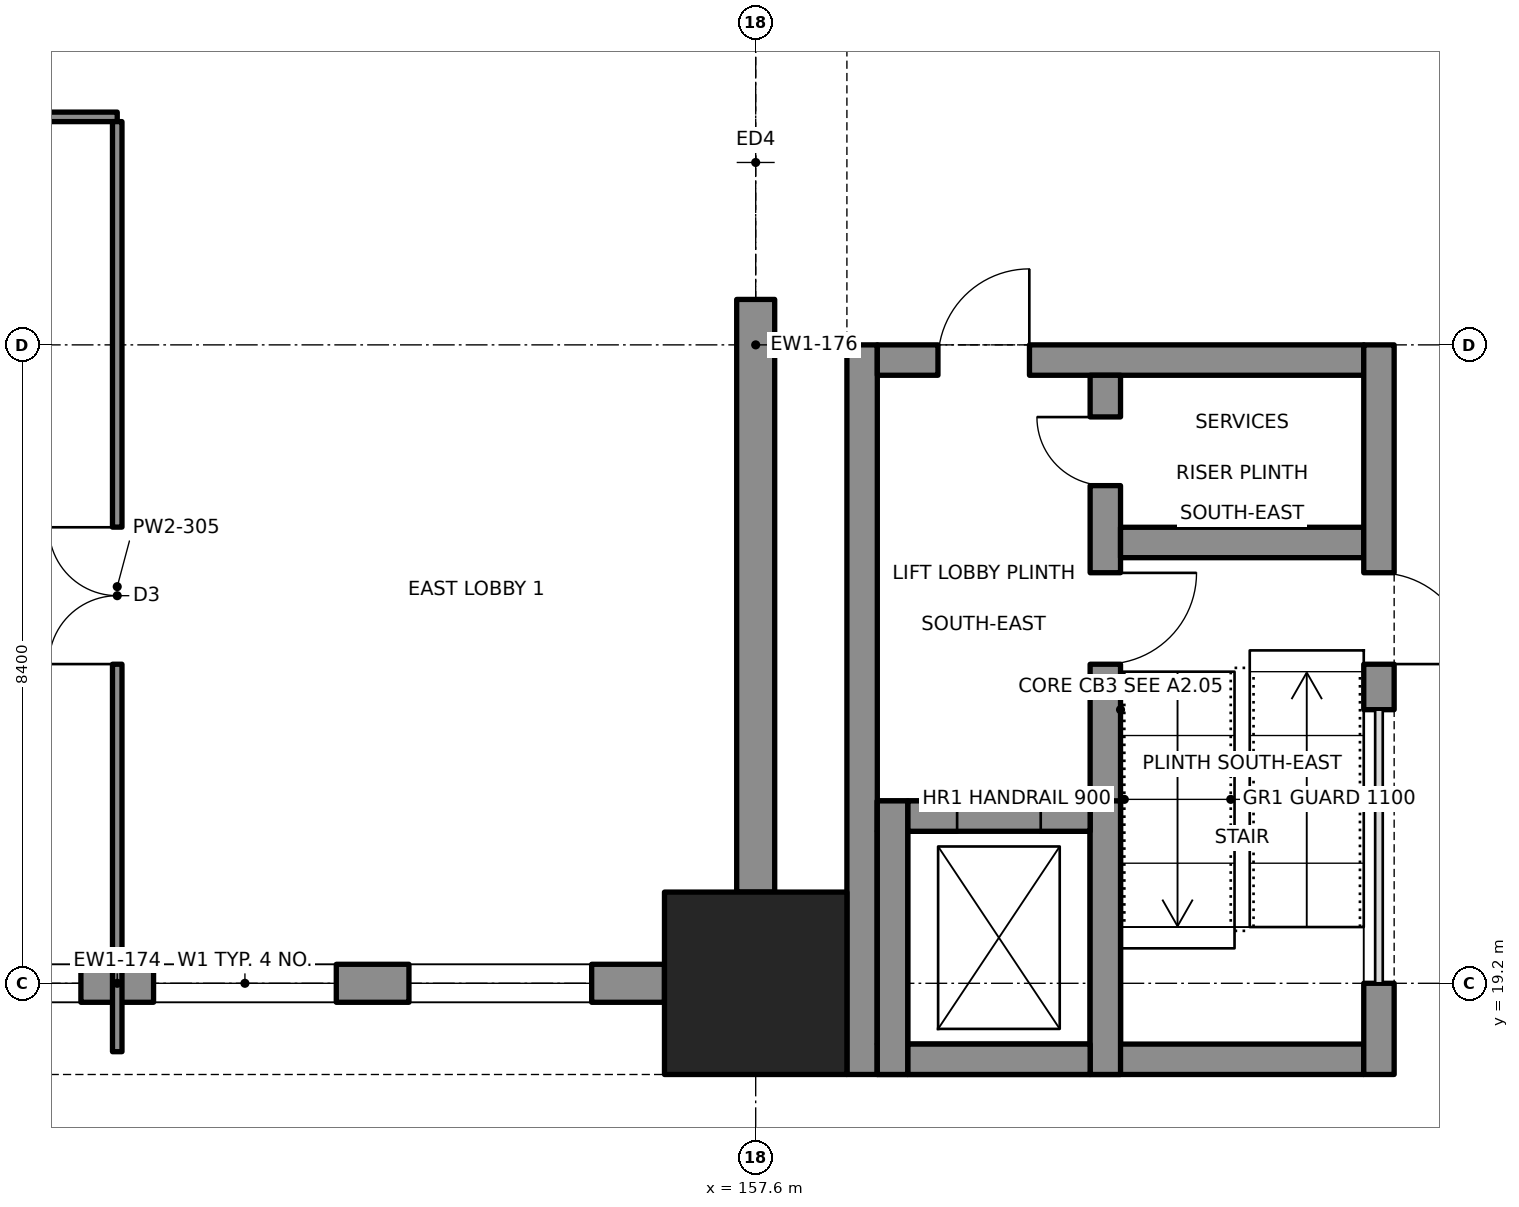
"""IFC4 building model, lengths in metres.
Left out: names, types, materials, properties, quantities, classifications, styles, units other than length and angle.
Written with IfcOpenShell. Run it as: python <this file> out.ifc"""

import sys

from ifc_helpers import new_model, si_unit, direction, frame, frame_2d, origin, origin_2d, place, context, subcontext, project, spatial, rectangle, extrude, element, fill, save


model = new_model("IFC4")
c1 = context("Model", 3, precision=1e-05, world=origin(), true_north=direction((0.0, 1.0)))
c2 = subcontext(c1, "Body", "Model", "MODEL_VIEW")
j1 = project(units=[si_unit("LENGTHUNIT", "METRE"), si_unit("PLANEANGLEUNIT", "RADIAN")], contexts=[c1])
p1 = place(None, origin())
s1 = spatial("IfcSite", under=j1, at=p1, CompositionType="ELEMENT")
p2 = place(p1, origin())
s2 = spatial("IfcBuilding", under=s1, at=p2, CompositionType="ELEMENT")
p3 = place(p2, origin())
s3 = spatial("IfcBuildingStorey", under=s2, at=p3, CompositionType="ELEMENT", Elevation=0.0)
p4 = place(p3, frame((157.6, 19.2, -0.9), z_axis=(0.0, 0.0, 1.0), x_axis=(1.0, 0.0, 0.0)))
e1 = element("IfcColumn", 1, at=p4, inside=s3, PredefinedType="COLUMN", context=c2, shape_type="SweptSolid", body=[
    extrude(rectangle(XDim=2.4, YDim=2.4, at=origin_2d()), origin(), (0.0, 0.0, 1.0), 5.3),
])
p5 = place(p3, frame((142.0, 19.2, 0.0), z_axis=(0.0, 0.0, 1.0), x_axis=(1.0, 0.0, 0.0)))
e2 = element("IfcWall", 2, at=p5, inside=s3, PredefinedType="SOLIDWALL", context=c2, shape_type="SweptSolid", body=[
    extrude(rectangle(XDim=14.4, YDim=0.5, at=frame_2d((7.2, 0.0))), origin(), (0.0, 0.0, 1.0), 3.65),
])
p6 = place(p5, frame((0.96, 0.0, 0.9)))
e3 = element("IfcOpeningElement", 3, at=p6, cuts=e2, PredefinedType="OPENING", context=c2, shape_type="SweptSolid", body=[
    extrude(rectangle(XDim=2.4, YDim=1.8, at=frame_2d((1.2, 0.9))), frame((0.0, 0.26, 0.0), z_axis=(0.0, -1.0, 0.0), x_axis=(1.0, 0.0, 0.0)), (0.0, 0.0, 1.0), 0.52),
])
p7 = place(p5, frame((4.32, 0.0, 0.9)))
e4 = element("IfcOpeningElement", 4, at=p7, cuts=e2, PredefinedType="OPENING", context=c2, shape_type="SweptSolid", body=[
    extrude(rectangle(XDim=2.4, YDim=1.8, at=frame_2d((1.2, 0.9))), frame((0.0, 0.26, 0.0), z_axis=(0.0, -1.0, 0.0), x_axis=(1.0, 0.0, 0.0)), (0.0, 0.0, 1.0), 0.52),
])
p8 = place(p5, frame((7.68, 0.0, 0.9)))
e5 = element("IfcOpeningElement", 5, at=p8, cuts=e2, PredefinedType="OPENING", context=c2, shape_type="SweptSolid", body=[
    extrude(rectangle(XDim=2.4, YDim=1.8, at=frame_2d((1.2, 0.9))), frame((0.0, 0.26, 0.0), z_axis=(0.0, -1.0, 0.0), x_axis=(1.0, 0.0, 0.0)), (0.0, 0.0, 1.0), 0.52),
])
p9 = place(p5, frame((11.04, 0.0, 0.9)))
e6 = element("IfcOpeningElement", 6, at=p9, cuts=e2, PredefinedType="OPENING", context=c2, shape_type="SweptSolid", body=[
    extrude(rectangle(XDim=2.4, YDim=1.8, at=frame_2d((1.2, 0.9))), frame((0.0, 0.26, 0.0), z_axis=(0.0, -1.0, 0.0), x_axis=(1.0, 0.0, 0.0)), (0.0, 0.0, 1.0), 0.52),
])
p10 = place(p3, frame((157.6, 20.4, 0.0), z_axis=(0.0, 0.0, 1.0), x_axis=(0.0, 1.0, 0.0)))
e7 = element("IfcWall", 7, at=p10, inside=s3, PredefinedType="SOLIDWALL", context=c2, shape_type="SweptSolid", body=[
    extrude(rectangle(XDim=14.4, YDim=0.5, at=frame_2d((7.2, 0.0))), origin(), (0.0, 0.0, 1.0), 3.65),
])
p11 = place(p10, frame((7.8, 0.0, 0.0)))
e8 = element("IfcOpeningElement", 8, at=p11, cuts=e7, PredefinedType="OPENING", context=c2, shape_type="SweptSolid", body=[
    extrude(rectangle(XDim=3.6, YDim=3.0, at=frame_2d((1.8, 1.5))), frame((0.0, 0.26, 0.0), z_axis=(0.0, -1.0, 0.0), x_axis=(1.0, 0.0, 0.0)), (0.0, 0.0, 1.0), 0.52),
])
p12 = place(p3, frame((165.8, 19.2, 0.0), z_axis=(0.0, 0.0, 1.0), x_axis=(0.0, -1.0, 0.0)))
e9 = element("IfcWall", 9, at=p12, inside=s3, PredefinedType="SHEAR", context=c2, shape_type="SweptSolid", body=[
    extrude(rectangle(XDim=1.2, YDim=0.4, at=frame_2d((0.6, 0.0))), origin(), (0.0, 0.0, 1.0), 4.4),
])
p13 = place(p3, frame((165.8, 27.6, 0.0), z_axis=(0.0, 0.0, 1.0), x_axis=(0.0, -1.0, 0.0)))
e10 = element("IfcWall", 10, at=p13, inside=s3, PredefinedType="SHEAR", context=c2, shape_type="SweptSolid", body=[
    extrude(rectangle(XDim=4.8, YDim=0.4, at=frame_2d((2.4, 0.0))), origin(), (0.0, 0.0, 1.0), 4.4),
])
p14 = place(p13, frame((3.0, 0.0, 0.0)))
e11 = element("IfcOpeningElement", 11, at=p14, cuts=e10, PredefinedType="OPENING", context=c2, shape_type="SweptSolid", body=[
    extrude(rectangle(XDim=1.2, YDim=2.1, at=frame_2d((0.6, 1.05))), frame((0.0, 0.21, 0.0), z_axis=(0.0, -1.0, 0.0), x_axis=(1.0, 0.0, 0.0)), (0.0, 0.0, 1.0), 0.42),
])
p15 = place(p3, frame((159.0, 18.0, 0.0), z_axis=(0.0, 0.0, 1.0), x_axis=(0.0, 1.0, 0.0)))
e12 = element("IfcWall", 12, at=p15, inside=s3, PredefinedType="SHEAR", context=c2, shape_type="SweptSolid", body=[
    extrude(rectangle(XDim=9.6, YDim=0.4, at=frame_2d((4.8, 0.0))), origin(), (0.0, 0.0, 1.0), 4.4),
])
p16 = place(p3, frame((159.2, 18.2, 0.0), z_axis=(0.0, 0.0, 1.0), x_axis=(1.0, 0.0, 0.0)))
e13 = element("IfcWall", 13, at=p16, inside=s3, PredefinedType="SHEAR", context=c2, shape_type="SweptSolid", body=[
    extrude(rectangle(XDim=6.4, YDim=0.4, at=frame_2d((3.2, 0.0))), origin(), (0.0, 0.0, 1.0), 4.4),
])
p17 = place(p3, frame((159.2, 27.4, 0.0), z_axis=(0.0, 0.0, 1.0), x_axis=(1.0, 0.0, 0.0)))
e14 = element("IfcWall", 14, at=p17, inside=s3, PredefinedType="SHEAR", context=c2, shape_type="SweptSolid", body=[
    extrude(rectangle(XDim=6.4, YDim=0.4, at=frame_2d((3.2, 0.0))), origin(), (0.0, 0.0, 1.0), 4.4),
])
p18 = place(p17, frame((0.8, 0.0, 0.0)))
e15 = element("IfcOpeningElement", 15, at=p18, cuts=e14, PredefinedType="OPENING", context=c2, shape_type="SweptSolid", body=[
    extrude(rectangle(XDim=1.2, YDim=2.1, at=frame_2d((0.6, 1.05))), frame((0.0, 0.21, 0.0), z_axis=(0.0, -1.0, 0.0), x_axis=(1.0, 0.0, 0.0)), (0.0, 0.0, 1.0), 0.42),
])
p19 = place(p3, frame((162.2, 18.4, 0.0), z_axis=(0.0, 0.0, 1.0), x_axis=(0.0, 1.0, 0.0)))
e16 = element("IfcWall", 16, at=p19, inside=s3, PredefinedType="SHEAR", context=c2, shape_type="SweptSolid", body=[
    extrude(rectangle(XDim=8.8, YDim=0.4, at=frame_2d((4.4, 0.0))), origin(), (0.0, 0.0, 1.0), 4.4),
])
p20 = place(p19, frame((5.0, 0.0, 0.0)))
e17 = element("IfcOpeningElement", 17, at=p20, cuts=e16, PredefinedType="OPENING", context=c2, shape_type="SweptSolid", body=[
    extrude(rectangle(XDim=1.2, YDim=2.1, at=frame_2d((0.6, 1.05))), frame((0.0, 0.21, 0.0), z_axis=(0.0, -1.0, 0.0), x_axis=(1.0, 0.0, 0.0)), (0.0, 0.0, 1.0), 0.42),
])
p21 = place(p19, frame((7.35, 0.0, 0.0)))
e18 = element("IfcOpeningElement", 18, at=p21, cuts=e16, PredefinedType="OPENING", context=c2, shape_type="SweptSolid", body=[
    extrude(rectangle(XDim=0.9, YDim=2.1, at=frame_2d((0.45, 1.05))), frame((0.0, 0.21, 0.0), z_axis=(0.0, -1.0, 0.0), x_axis=(1.0, 0.0, 0.0)), (0.0, 0.0, 1.0), 0.42),
])
p22 = place(p3, frame((162.4, 25.0, 0.0), z_axis=(0.0, 0.0, 1.0), x_axis=(1.0, 0.0, 0.0)))
e19 = element("IfcWall", 19, at=p22, inside=s3, PredefinedType="SHEAR", context=c2, shape_type="SweptSolid", body=[
    extrude(rectangle(XDim=3.2, YDim=0.4, at=frame_2d((1.6, 0.0))), origin(), (0.0, 0.0, 1.0), 4.4),
])
p23 = place(p3, frame((159.2, 21.4, 0.0), z_axis=(0.0, 0.0, 1.0), x_axis=(1.0, 0.0, 0.0)))
e20 = element("IfcWall", 20, at=p23, inside=s3, PredefinedType="SHEAR", context=c2, shape_type="SweptSolid", body=[
    extrude(rectangle(XDim=2.8, YDim=0.4, at=frame_2d((1.4, 0.0))), origin(), (0.0, 0.0, 1.0), 4.4),
])
p24 = place(p23, frame((1.05, 0.0, 0.0)))
e21 = element("IfcOpeningElement", 21, at=p24, cuts=e20, PredefinedType="OPENING", context=c2, shape_type="SweptSolid", body=[
    extrude(rectangle(XDim=1.1, YDim=2.1, at=frame_2d((0.55, 1.05))), frame((0.0, 0.21, 0.0), z_axis=(0.0, -1.0, 0.0), x_axis=(1.0, 0.0, 0.0)), (0.0, 0.0, 1.0), 0.42),
])
p25 = place(p3, frame((159.4, 18.4, 0.0), z_axis=(0.0, 0.0, 1.0), x_axis=(0.0, 1.0, 0.0)))
e22 = element("IfcWall", 22, at=p25, inside=s3, PredefinedType="SHEAR", context=c2, shape_type="SweptSolid", body=[
    extrude(rectangle(XDim=2.8, YDim=0.4, at=frame_2d((1.4, 0.0))), origin(), (0.0, 0.0, 1.0), 4.4),
])
for number, where, z_axis, x_axis in (
    (23, (159.4, 18.0, -1.5), (0.0, 0.0, 1.0), (0.0, 1.0, 0.0)),
    (24, (162.2, 18.0, -1.5), (0.0, 0.0, 1.0), (0.0, 1.0, 0.0)),
):
    element("IfcWall", number, at=place(p3, frame(where, z_axis=z_axis, x_axis=x_axis)), inside=s3, PredefinedType="SHEAR", context=c2, shape_type="SweptSolid", body=[
        extrude(rectangle(XDim=3.6, YDim=0.4, at=frame_2d((1.8, 0.0))), origin(), (0.0, 0.0, 1.0), 1.5),
    ])
for number, where, z_axis, x_axis in (
    (25, (159.6, 18.2, -1.5), (0.0, 0.0, 1.0), (1.0, 0.0, 0.0)),
    (26, (159.6, 21.4, -1.5), (0.0, 0.0, 1.0), (1.0, 0.0, 0.0)),
):
    element("IfcWall", number, at=place(p3, frame(where, z_axis=z_axis, x_axis=x_axis)), inside=s3, PredefinedType="SHEAR", context=c2, shape_type="SweptSolid", body=[
        extrude(rectangle(XDim=2.4, YDim=0.4, at=frame_2d((1.2, 0.0))), origin(), (0.0, 0.0, 1.0), 1.5),
    ])
p26 = place(p3, frame((126.0, 30.6, 0.0), z_axis=(0.0, 0.0, 1.0), x_axis=(1.0, 0.0, 0.0)))
e27 = element("IfcWall", 27, at=p26, inside=s3, PredefinedType="PARTITIONING", context=c2, shape_type="SweptSolid", body=[
    extrude(rectangle(XDim=23.2, YDim=0.125, at=frame_2d((11.6, 0.0))), origin(), (0.0, 0.0, 1.0), 3.65),
])
p27 = place(p26, frame((10.7, 0.0, 0.0)))
e28 = element("IfcOpeningElement", 28, at=p27, cuts=e27, PredefinedType="OPENING", context=c2, shape_type="SweptSolid", body=[
    extrude(rectangle(XDim=1.8, YDim=2.1, at=frame_2d((0.9, 1.05))), frame((0.0, 0.073, 0.0), z_axis=(0.0, -1.0, 0.0), x_axis=(1.0, 0.0, 0.0)), (0.0, 0.0, 1.0), 0.145),
])
p28 = place(p3, frame((149.2, 18.3, 0.0), z_axis=(0.0, 0.0, 1.0), x_axis=(0.0, 1.0, 0.0)))
e29 = element("IfcWall", 29, at=p28, inside=s3, PredefinedType="PARTITIONING", context=c2, shape_type="SweptSolid", body=[
    extrude(rectangle(XDim=12.238, YDim=0.125, at=frame_2d((6.119, 0.0))), origin(), (0.0, 0.0, 1.0), 3.65),
])
p29 = place(p28, frame((5.1, 0.0, 0.0)))
e30 = element("IfcOpeningElement", 30, at=p29, cuts=e29, PredefinedType="OPENING", context=c2, shape_type="SweptSolid", body=[
    extrude(rectangle(XDim=1.8, YDim=2.1, at=frame_2d((0.9, 1.05))), frame((0.0, 0.073, 0.0), z_axis=(0.0, -1.0, 0.0), x_axis=(1.0, 0.0, 0.0)), (0.0, 0.0, 1.0), 0.145),
])
p30 = place(p7, origin())
e31 = element("IfcWindow", 31, at=p30, inside=s3, PartitioningType="SINGLE_PANEL", PredefinedType="WINDOW", context=c2, shape_type="SweptSolid", body=[
    extrude(rectangle(XDim=2.4, YDim=1.8, at=frame_2d((1.2, 0.9))), frame((0.0, 0.03, 0.0), z_axis=(0.0, -1.0, 0.0), x_axis=(1.0, 0.0, 0.0)), (0.0, 0.0, 1.0), 0.06),
])
fill(e4, e31)
p31 = place(p8, origin())
e32 = element("IfcWindow", 32, at=p31, inside=s3, PartitioningType="SINGLE_PANEL", PredefinedType="WINDOW", context=c2, shape_type="SweptSolid", body=[
    extrude(rectangle(XDim=2.4, YDim=1.8, at=frame_2d((1.2, 0.9))), frame((0.0, 0.03, 0.0), z_axis=(0.0, -1.0, 0.0), x_axis=(1.0, 0.0, 0.0)), (0.0, 0.0, 1.0), 0.06),
])
fill(e5, e32)
p32 = place(p9, origin())
e33 = element("IfcWindow", 33, at=p32, inside=s3, PartitioningType="SINGLE_PANEL", PredefinedType="WINDOW", context=c2, shape_type="SweptSolid", body=[
    extrude(rectangle(XDim=2.4, YDim=1.8, at=frame_2d((1.2, 0.9))), frame((0.0, 0.03, 0.0), z_axis=(0.0, -1.0, 0.0), x_axis=(1.0, 0.0, 0.0)), (0.0, 0.0, 1.0), 0.06),
])
fill(e6, e33)
p33 = place(p11, origin())
e34 = element("IfcDoor", 34, at=p33, inside=s3, OperationType="ROLLINGUP", PredefinedType="DOOR", context=c2, shape_type="SweptSolid", body=[
    extrude(rectangle(XDim=3.6, YDim=3.0, at=frame_2d((1.8, 1.5))), frame((0.0, 0.025, 0.0), z_axis=(0.0, -1.0, 0.0), x_axis=(1.0, 0.0, 0.0)), (0.0, 0.0, 1.0), 0.05),
])
fill(e8, e34)
p34 = place(p14, origin())
e35 = element("IfcDoor", 35, at=p34, inside=s3, OperationType="SINGLE_SWING_RIGHT", PredefinedType="DOOR", context=c2, shape_type="SweptSolid", body=[
    extrude(rectangle(XDim=1.2, YDim=2.1, at=frame_2d((0.6, 1.05))), frame((0.0, 0.025, 0.0), z_axis=(0.0, -1.0, 0.0), x_axis=(1.0, 0.0, 0.0)), (0.0, 0.0, 1.0), 0.05),
])
fill(e11, e35)
p35 = place(p18, origin())
e36 = element("IfcDoor", 36, at=p35, inside=s3, OperationType="SINGLE_SWING_RIGHT", PredefinedType="DOOR", context=c2, shape_type="SweptSolid", body=[
    extrude(rectangle(XDim=1.2, YDim=2.1, at=frame_2d((0.6, 1.05))), frame((0.0, 0.025, 0.0), z_axis=(0.0, -1.0, 0.0), x_axis=(1.0, 0.0, 0.0)), (0.0, 0.0, 1.0), 0.05),
])
fill(e15, e36)
p36 = place(p20, origin())
e37 = element("IfcDoor", 37, at=p36, inside=s3, OperationType="SINGLE_SWING_RIGHT", PredefinedType="DOOR", context=c2, shape_type="SweptSolid", body=[
    extrude(rectangle(XDim=1.2, YDim=2.1, at=frame_2d((0.6, 1.05))), frame((0.0, 0.025, 0.0), z_axis=(0.0, -1.0, 0.0), x_axis=(1.0, 0.0, 0.0)), (0.0, 0.0, 1.0), 0.05),
])
fill(e17, e37)
p37 = place(p21, origin())
e38 = element("IfcDoor", 38, at=p37, inside=s3, OperationType="SINGLE_SWING_RIGHT", PredefinedType="DOOR", context=c2, shape_type="SweptSolid", body=[
    extrude(rectangle(XDim=0.9, YDim=2.1, at=frame_2d((0.45, 1.05))), frame((0.0, 0.025, 0.0), z_axis=(0.0, -1.0, 0.0), x_axis=(1.0, 0.0, 0.0)), (0.0, 0.0, 1.0), 0.05),
])
fill(e18, e38)
p38 = place(p24, origin())
e39 = element("IfcDoor", 39, at=p38, inside=s3, OperationType="SLIDING_TO_RIGHT", PredefinedType="DOOR", context=c2, shape_type="SweptSolid", body=[
    extrude(rectangle(XDim=1.1, YDim=2.1, at=frame_2d((0.55, 1.05))), frame((0.0, 0.025, 0.0), z_axis=(0.0, -1.0, 0.0), x_axis=(1.0, 0.0, 0.0)), (0.0, 0.0, 1.0), 0.05),
])
fill(e21, e39)
p39 = place(p29, origin())
e40 = element("IfcDoor", 40, at=p39, inside=s3, OperationType="DOUBLE_DOOR_SINGLE_SWING", PredefinedType="DOOR", context=c2, shape_type="SweptSolid", body=[
    extrude(rectangle(XDim=1.8, YDim=2.1, at=frame_2d((0.9, 1.05))), frame((0.0, 0.025, 0.0), z_axis=(0.0, -1.0, 0.0), x_axis=(1.0, 0.0, 0.0)), (0.0, 0.0, 1.0), 0.05),
])
fill(e30, e40)
save(model, sys.argv[1])
